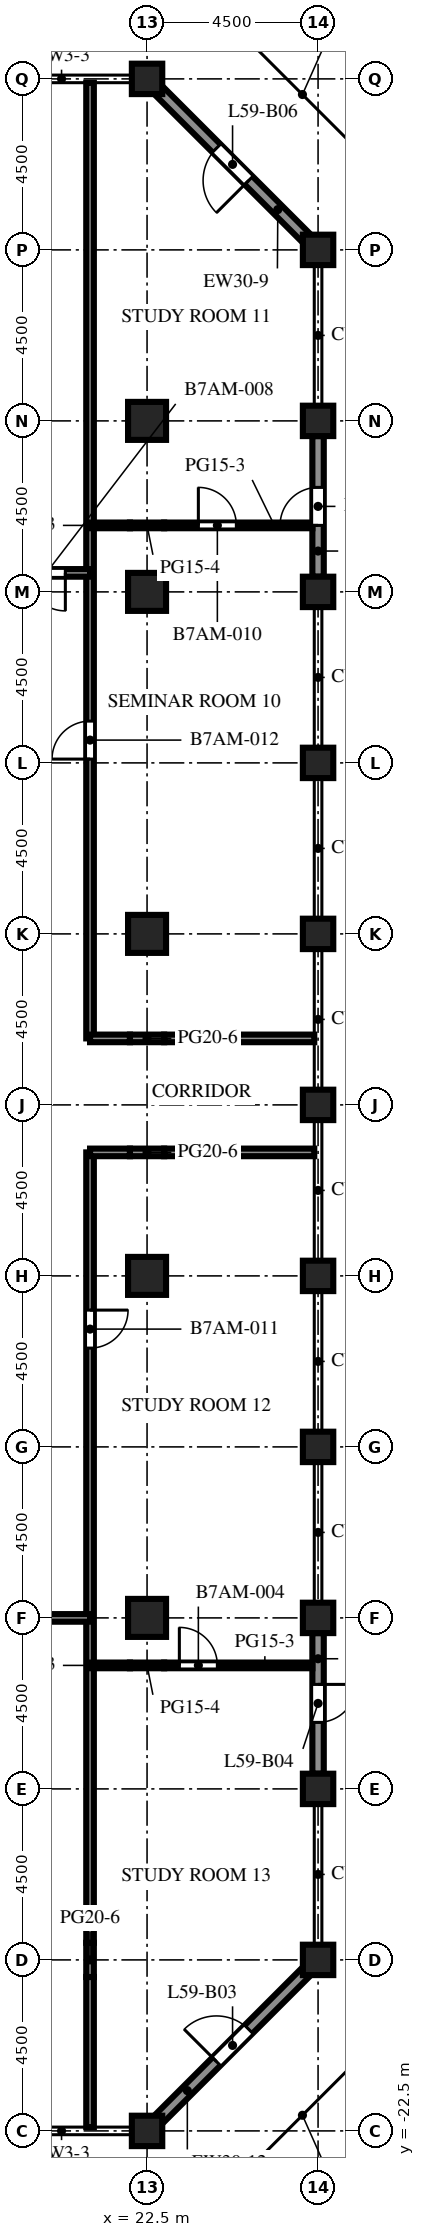
"""IFC4 building model, lengths in metres.
Left out: names, types, materials, properties, quantities, classifications, styles, units other than length and angle.
Written with IfcOpenShell. Run it as: python <this file> out.ifc"""

import sys

from ifc_helpers import new_model, si_unit, direction, frame, frame_2d, origin, origin_2d, place, context, subcontext, project, spatial, rectangle, extrude, element, fill, save


model = new_model("IFC4")
c1 = context("Model", 3, precision=1e-05, world=origin(), true_north=direction((0.0, 1.0)))
c2 = subcontext(c1, "Body", "Model", "MODEL_VIEW")
j1 = project(units=[si_unit("LENGTHUNIT", "METRE"), si_unit("PLANEANGLEUNIT", "RADIAN")], contexts=[c1])
p1 = place(None, origin())
s1 = spatial("IfcSite", under=j1, at=p1, CompositionType="ELEMENT")
p2 = place(p1, origin())
s2 = spatial("IfcBuilding", under=s1, at=p2, CompositionType="ELEMENT")
p3 = place(p2, frame((0.0, 0.0, 260.3)))
s3 = spatial("IfcBuildingStorey", under=s2, at=p3, CompositionType="ELEMENT", Elevation=260.3)
for number, where, z_axis, x_axis in (
    (1, (22.5, -22.5, 0.0), (0.0, 0.0, 1.0), (1.0, 0.0, 0.0)),
    (2, (22.5, 31.5, 0.0), (0.0, 0.0, 1.0), (1.0, 0.0, 0.0)),
):
    element("IfcColumn", number, at=place(p3, frame(where, z_axis=z_axis, x_axis=x_axis)), inside=s3, PredefinedType="COLUMN", context=c2, shape_type="SweptSolid", body=[
        extrude(rectangle(XDim=0.8, YDim=0.8, at=origin_2d()), origin(), (0.0, 0.0, 1.0), 6.0),
    ])
p4 = place(p3, frame((27.0, -18.0, 0.0), z_axis=(0.0, 0.0, 1.0), x_axis=(1.0, 0.0, 0.0)))
e3 = element("IfcColumn", 3, at=p4, inside=s3, PredefinedType="COLUMN", context=c2, shape_type="SweptSolid", body=[
    extrude(rectangle(XDim=0.8, YDim=0.8, at=origin_2d()), origin(), (0.0, 0.0, 1.0), 3.75),
])
for number, where, z_axis, x_axis in (
    (4, (27.0, -13.5, 0.0), (0.0, 0.0, 1.0), (1.0, 0.0, 0.0)),
    (5, (27.0, -9.0, 0.0), (0.0, 0.0, 1.0), (1.0, 0.0, 0.0)),
    (6, (27.0, -4.5, 0.0), (0.0, 0.0, 1.0), (1.0, 0.0, 0.0)),
    (7, (27.0, 0.0, 0.0), (0.0, 0.0, 1.0), (1.0, 0.0, 0.0)),
    (8, (27.0, 4.5, 0.0), (0.0, 0.0, 1.0), (1.0, 0.0, 0.0)),
    (9, (27.0, 9.0, 0.0), (0.0, 0.0, 1.0), (1.0, 0.0, 0.0)),
    (10, (27.0, 13.5, 0.0), (0.0, 0.0, 1.0), (1.0, 0.0, 0.0)),
    (11, (27.0, 18.0, 0.0), (0.0, 0.0, 1.0), (1.0, 0.0, 0.0)),
    (12, (27.0, 22.5, 0.0), (0.0, 0.0, 1.0), (1.0, 0.0, 0.0)),
    (13, (27.0, 27.0, 0.0), (0.0, 0.0, 1.0), (1.0, 0.0, 0.0)),
):
    element("IfcColumn", number, at=place(p3, frame(where, z_axis=z_axis, x_axis=x_axis)), inside=s3, PredefinedType="COLUMN", context=c2, shape_type="SweptSolid", body=[
        extrude(rectangle(XDim=0.8, YDim=0.8, at=origin_2d()), origin(), (0.0, 0.0, 1.0), 6.0),
    ])
for number, where, z_axis, x_axis in (
    (14, (22.5, -9.0, 0.0), (0.0, 0.0, 1.0), (1.0, 0.0, 0.0)),
    (15, (22.5, 0.0, 0.0), (0.0, 0.0, 1.0), (1.0, 0.0, 0.0)),
    (16, (22.5, 9.0, 0.0), (0.0, 0.0, 1.0), (1.0, 0.0, 0.0)),
    (17, (22.5, 18.0, 0.0), (0.0, 0.0, 1.0), (1.0, 0.0, 0.0)),
    (18, (22.5, 22.5, 0.0), (0.0, 0.0, 1.0), (1.0, 0.0, 0.0)),
):
    element("IfcColumn", number, at=place(p3, frame(where, z_axis=z_axis, x_axis=x_axis)), inside=s3, PredefinedType="COLUMN", context=c2, shape_type="SweptSolid", body=[
        extrude(rectangle(XDim=1.0, YDim=1.0, at=origin_2d()), origin(), (0.0, 0.0, 1.0), 5.55),
    ])
p5 = place(p3, frame((26.706, -18.294, 0.0), z_axis=(0.0, 0.0, 1.0), x_axis=(-0.707106781187, -0.707106781187, 0.0)))
e19 = element("IfcWall", 19, at=p5, inside=s3, PredefinedType="SOLIDWALL", context=c2, shape_type="SweptSolid", body=[
    extrude(rectangle(XDim=5.532, YDim=0.3, at=frame_2d((2.766, 0.0))), origin(), (0.0, 0.0, 1.0), 3.75),
])
p6 = place(p5, frame((2.166, 0.0, 0.0)))
e20 = element("IfcOpeningElement", 20, at=p6, cuts=e19, PredefinedType="OPENING", context=c2, shape_type="SweptSolid", body=[
    extrude(rectangle(XDim=1.2, YDim=2.2, at=frame_2d((0.6, 1.1))), frame((0.0, 0.16, 0.0), z_axis=(0.0, -1.0, 0.0), x_axis=(1.0, 0.0, 0.0)), (0.0, 0.0, 1.0), 0.32),
])
p7 = place(p3, frame((27.0, -9.4, 0.0), z_axis=(0.0, 0.0, 1.0), x_axis=(0.0, -1.0, 0.0)))
e21 = element("IfcWall", 21, at=p7, inside=s3, PredefinedType="SOLIDWALL", context=c2, shape_type="SweptSolid", body=[
    extrude(rectangle(XDim=3.7, YDim=0.3, at=frame_2d((1.85, 0.0))), origin(), (0.0, 0.0, 1.0), 4.75),
])
p8 = place(p7, frame((1.35, 0.0, 0.0)))
e22 = element("IfcOpeningElement", 22, at=p8, cuts=e21, PredefinedType="OPENING", context=c2, shape_type="SweptSolid", body=[
    extrude(rectangle(XDim=1.0, YDim=2.2, at=frame_2d((0.5, 1.1))), frame((0.0, 0.16, 0.0), z_axis=(0.0, -1.0, 0.0), x_axis=(1.0, 0.0, 0.0)), (0.0, 0.0, 1.0), 0.32),
])
p9 = place(p3, frame((27.0, 22.1, 0.0), z_axis=(0.0, 0.0, 1.0), x_axis=(0.0, -1.0, 0.0)))
e23 = element("IfcWall", 23, at=p9, inside=s3, PredefinedType="SOLIDWALL", context=c2, shape_type="SweptSolid", body=[
    extrude(rectangle(XDim=3.7, YDim=0.3, at=frame_2d((1.85, 0.0))), origin(), (0.0, 0.0, 1.0), 4.75),
])
p10 = place(p9, frame((1.35, 0.0, 0.0)))
e24 = element("IfcOpeningElement", 24, at=p10, cuts=e23, PredefinedType="OPENING", context=c2, shape_type="SweptSolid", body=[
    extrude(rectangle(XDim=1.0, YDim=2.2, at=frame_2d((0.5, 1.1))), frame((0.0, 0.16, 0.0), z_axis=(0.0, -1.0, 0.0), x_axis=(1.0, 0.0, 0.0)), (0.0, 0.0, 1.0), 0.32),
])
p11 = place(p3, frame((22.794, 31.206, 0.0), z_axis=(0.0, 0.0, 1.0), x_axis=(0.707106781187, -0.707106781187, 0.0)))
e25 = element("IfcWall", 25, at=p11, inside=s3, PredefinedType="SOLIDWALL", context=c2, shape_type="SweptSolid", body=[
    extrude(rectangle(XDim=5.532, YDim=0.3, at=frame_2d((2.766, 0.0))), origin(), (0.0, 0.0, 1.0), 4.75),
])
p12 = place(p11, frame((2.166, 0.0, 0.0)))
e26 = element("IfcOpeningElement", 26, at=p12, cuts=e25, PredefinedType="OPENING", context=c2, shape_type="SweptSolid", body=[
    extrude(rectangle(XDim=1.2, YDim=2.2, at=frame_2d((0.6, 1.1))), frame((0.0, 0.16, 0.0), z_axis=(0.0, -1.0, 0.0), x_axis=(1.0, 0.0, 0.0)), (0.0, 0.0, 1.0), 0.32),
])
p13 = place(p3, frame((21.0, -22.4, 0.0), z_axis=(0.0, 0.0, 1.0), x_axis=(0.0, 1.0, 0.0)))
e27 = element("IfcWall", 27, at=p13, inside=s3, PredefinedType="PARTITIONING", context=c2, shape_type="SweptSolid", body=[
    extrude(rectangle(XDim=3.95, YDim=0.2, at=frame_2d((1.975, 0.0))), origin(), (0.0, 0.0, 1.0), 5.55),
])
p14 = place(p3, frame((21.0, -18.45, 0.0), z_axis=(0.0, 0.0, 1.0), x_axis=(0.0, 1.0, 0.0)))
e28 = element("IfcWall", 28, at=p14, inside=s3, PredefinedType="PARTITIONING", context=c2, shape_type="SweptSolid", body=[
    extrude(rectangle(XDim=0.9, YDim=0.2, at=frame_2d((0.45, 0.0))), origin(), (0.0, 0.0, 1.0), 3.72),
])
p15 = place(p3, frame((21.0, 3.25, 0.0), z_axis=(0.0, 0.0, 1.0), x_axis=(0.0, -1.0, 0.0)))
e29 = element("IfcWall", 29, at=p15, inside=s3, PredefinedType="PARTITIONING", context=c2, shape_type="SweptSolid", body=[
    extrude(rectangle(XDim=20.8, YDim=0.2, at=frame_2d((10.4, 0.0))), origin(), (0.0, 0.0, 1.0), 5.55),
])
p16 = place(p15, frame((4.15, 0.0, 0.0)))
e30 = element("IfcOpeningElement", 30, at=p16, cuts=e29, PredefinedType="OPENING", context=c2, shape_type="SweptSolid", body=[
    extrude(rectangle(XDim=1.0, YDim=2.1, at=frame_2d((0.5, 1.05))), frame((0.0, 0.11, 0.0), z_axis=(0.0, -1.0, 0.0), x_axis=(1.0, 0.0, 0.0)), (0.0, 0.0, 1.0), 0.22),
])
p17 = place(p3, frame((21.0, 31.4, 0.0), z_axis=(0.0, 0.0, 1.0), x_axis=(0.0, -1.0, 0.0)))
e31 = element("IfcWall", 31, at=p17, inside=s3, PredefinedType="PARTITIONING", context=c2, shape_type="SweptSolid", body=[
    extrude(rectangle(XDim=25.15, YDim=0.2, at=frame_2d((12.575, 0.0))), origin(), (0.0, 0.0, 1.0), 5.55),
])
p18 = place(p17, frame((16.8, 0.0, 0.0)))
e32 = element("IfcOpeningElement", 32, at=p18, cuts=e31, PredefinedType="OPENING", context=c2, shape_type="SweptSolid", body=[
    extrude(rectangle(XDim=1.0, YDim=2.1, at=frame_2d((0.5, 1.05))), frame((0.0, 0.11, 0.0), z_axis=(0.0, -1.0, 0.0), x_axis=(1.0, 0.0, 0.0)), (0.0, 0.0, 1.0), 0.22),
])
p19 = place(p3, frame((21.0, -10.25, 0.0), z_axis=(0.0, 0.0, 1.0), x_axis=(1.0, 0.0, 0.0)))
e33 = element("IfcWall", 33, at=p19, inside=s3, PredefinedType="PARTITIONING", context=c2, shape_type="SweptSolid", body=[
    extrude(rectangle(XDim=1.05, YDim=0.15, at=frame_2d((0.525, 0.0))), origin(), (0.0, 0.0, 1.0), 5.55),
])
p20 = place(p3, frame((22.05, -10.25, 0.0), z_axis=(0.0, 0.0, 1.0), x_axis=(1.0, 0.0, 0.0)))
e34 = element("IfcWall", 34, at=p20, inside=s3, PredefinedType="PARTITIONING", context=c2, shape_type="SweptSolid", body=[
    extrude(rectangle(XDim=0.9, YDim=0.15, at=frame_2d((0.45, 0.0))), origin(), (0.0, 0.0, 1.0), 3.72),
])
p21 = place(p3, frame((26.85, -10.25, 0.0), z_axis=(0.0, 0.0, 1.0), x_axis=(-1.0, 0.0, 0.0)))
e35 = element("IfcWall", 35, at=p21, inside=s3, PredefinedType="PARTITIONING", context=c2, shape_type="SweptSolid", body=[
    extrude(rectangle(XDim=3.9, YDim=0.15, at=frame_2d((1.95, 0.0))), origin(), (0.0, 0.0, 1.0), 5.55),
])
p22 = place(p21, frame((2.5, 0.0, 0.0)))
e36 = element("IfcOpeningElement", 36, at=p22, cuts=e35, PredefinedType="OPENING", context=c2, shape_type="SweptSolid", body=[
    extrude(rectangle(XDim=1.0, YDim=2.1, at=frame_2d((0.5, 1.05))), frame((0.0, 0.085, 0.0), z_axis=(0.0, -1.0, 0.0), x_axis=(1.0, 0.0, 0.0)), (0.0, 0.0, 1.0), 0.17),
])
p23 = place(p3, frame((18.0, -9.0, 0.0), z_axis=(0.0, 0.0, 1.0), x_axis=(1.0, 0.0, 0.0)))
e37 = element("IfcWall", 37, at=p23, inside=s3, PredefinedType="PARTITIONING", context=c2, shape_type="SweptSolid", body=[
    extrude(rectangle(XDim=3.0, YDim=0.2, at=frame_2d((1.5, 0.0))), origin(), (0.0, 0.0, 1.0), 5.55),
])
p24 = place(p3, frame((21.0, 3.25, 0.0), z_axis=(0.0, 0.0, 1.0), x_axis=(1.0, 0.0, 0.0)))
e38 = element("IfcWall", 38, at=p24, inside=s3, PredefinedType="PARTITIONING", context=c2, shape_type="SweptSolid", body=[
    extrude(rectangle(XDim=1.05, YDim=0.2, at=frame_2d((0.525, 0.0))), origin(), (0.0, 0.0, 1.0), 5.55),
])
p25 = place(p3, frame((22.05, 3.25, 0.0), z_axis=(0.0, 0.0, 1.0), x_axis=(1.0, 0.0, 0.0)))
e39 = element("IfcWall", 39, at=p25, inside=s3, PredefinedType="PARTITIONING", context=c2, shape_type="SweptSolid", body=[
    extrude(rectangle(XDim=0.9, YDim=0.2, at=frame_2d((0.45, 0.0))), origin(), (0.0, 0.0, 1.0), 3.72),
])
p26 = place(p3, frame((22.95, 3.25, 0.0), z_axis=(0.0, 0.0, 1.0), x_axis=(1.0, 0.0, 0.0)))
e40 = element("IfcWall", 40, at=p26, inside=s3, PredefinedType="PARTITIONING", context=c2, shape_type="SweptSolid", body=[
    extrude(rectangle(XDim=3.95, YDim=0.2, at=frame_2d((1.975, 0.0))), origin(), (0.0, 0.0, 1.0), 5.55),
])
p27 = place(p3, frame((21.0, 6.25, 0.0), z_axis=(0.0, 0.0, 1.0), x_axis=(1.0, 0.0, 0.0)))
e41 = element("IfcWall", 41, at=p27, inside=s3, PredefinedType="PARTITIONING", context=c2, shape_type="SweptSolid", body=[
    extrude(rectangle(XDim=1.05, YDim=0.2, at=frame_2d((0.525, 0.0))), origin(), (0.0, 0.0, 1.0), 5.55),
])
p28 = place(p3, frame((22.05, 6.25, 0.0), z_axis=(0.0, 0.0, 1.0), x_axis=(1.0, 0.0, 0.0)))
e42 = element("IfcWall", 42, at=p28, inside=s3, PredefinedType="PARTITIONING", context=c2, shape_type="SweptSolid", body=[
    extrude(rectangle(XDim=0.9, YDim=0.2, at=frame_2d((0.45, 0.0))), origin(), (0.0, 0.0, 1.0), 3.72),
])
p29 = place(p3, frame((22.95, 6.25, 0.0), z_axis=(0.0, 0.0, 1.0), x_axis=(1.0, 0.0, 0.0)))
e43 = element("IfcWall", 43, at=p29, inside=s3, PredefinedType="PARTITIONING", context=c2, shape_type="SweptSolid", body=[
    extrude(rectangle(XDim=3.95, YDim=0.2, at=frame_2d((1.975, 0.0))), origin(), (0.0, 0.0, 1.0), 5.55),
])
p30 = place(p3, frame((18.0, 18.5, 0.0), z_axis=(0.0, 0.0, 1.0), x_axis=(1.0, 0.0, 0.0)))
e44 = element("IfcWall", 44, at=p30, inside=s3, PredefinedType="PARTITIONING", context=c2, shape_type="SweptSolid", body=[
    extrude(rectangle(XDim=3.0, YDim=0.2, at=frame_2d((1.5, 0.0))), origin(), (0.0, 0.0, 1.0), 5.55),
])
p31 = place(p30, frame((1.35, 0.0, 0.0)))
e45 = element("IfcOpeningElement", 45, at=p31, cuts=e44, PredefinedType="OPENING", context=c2, shape_type="SweptSolid", body=[
    extrude(rectangle(XDim=1.0, YDim=2.1, at=frame_2d((0.5, 1.05))), frame((0.0, 0.11, 0.0), z_axis=(0.0, -1.0, 0.0), x_axis=(1.0, 0.0, 0.0)), (0.0, 0.0, 1.0), 0.22),
])
p32 = place(p3, frame((21.0, 19.75, 0.0), z_axis=(0.0, 0.0, 1.0), x_axis=(1.0, 0.0, 0.0)))
e46 = element("IfcWall", 46, at=p32, inside=s3, PredefinedType="PARTITIONING", context=c2, shape_type="SweptSolid", body=[
    extrude(rectangle(XDim=1.05, YDim=0.15, at=frame_2d((0.525, 0.0))), origin(), (0.0, 0.0, 1.0), 5.55),
])
p33 = place(p3, frame((22.05, 19.75, 0.0), z_axis=(0.0, 0.0, 1.0), x_axis=(1.0, 0.0, 0.0)))
e47 = element("IfcWall", 47, at=p33, inside=s3, PredefinedType="PARTITIONING", context=c2, shape_type="SweptSolid", body=[
    extrude(rectangle(XDim=0.9, YDim=0.15, at=frame_2d((0.45, 0.0))), origin(), (0.0, 0.0, 1.0), 3.72),
])
p34 = place(p3, frame((22.95, 19.75, 0.0), z_axis=(0.0, 0.0, 1.0), x_axis=(1.0, 0.0, 0.0)))
e48 = element("IfcWall", 48, at=p34, inside=s3, PredefinedType="PARTITIONING", context=c2, shape_type="SweptSolid", body=[
    extrude(rectangle(XDim=3.9, YDim=0.15, at=frame_2d((1.95, 0.0))), origin(), (0.0, 0.0, 1.0), 5.55),
])
p35 = place(p34, frame((0.9, 0.0, 0.0)))
e49 = element("IfcOpeningElement", 49, at=p35, cuts=e48, PredefinedType="OPENING", context=c2, shape_type="SweptSolid", body=[
    extrude(rectangle(XDim=1.0, YDim=2.1, at=frame_2d((0.5, 1.05))), frame((0.0, 0.085, 0.0), z_axis=(0.0, -1.0, 0.0), x_axis=(1.0, 0.0, 0.0)), (0.0, 0.0, 1.0), 0.17),
])
p36 = place(p6, origin())
e50 = element("IfcDoor", 50, at=p36, inside=s3, OperationType="SINGLE_SWING_RIGHT", PredefinedType="DOOR", context=c2, shape_type="SweptSolid", body=[
    extrude(rectangle(XDim=1.2, YDim=2.2, at=frame_2d((0.6, 1.1))), frame((0.0, 0.025, 0.0), z_axis=(0.0, -1.0, 0.0), x_axis=(1.0, 0.0, 0.0)), (0.0, 0.0, 1.0), 0.05),
])
fill(e20, e50)
p37 = place(p8, origin())
e51 = element("IfcDoor", 51, at=p37, inside=s3, OperationType="SINGLE_SWING_LEFT", PredefinedType="DOOR", context=c2, shape_type="SweptSolid", body=[
    extrude(rectangle(XDim=1.0, YDim=2.2, at=frame_2d((0.5, 1.1))), frame((0.0, 0.025, 0.0), z_axis=(0.0, -1.0, 0.0), x_axis=(1.0, 0.0, 0.0)), (0.0, 0.0, 1.0), 0.05),
])
fill(e22, e51)
p38 = place(p10, origin())
e52 = element("IfcDoor", 52, at=p38, inside=s3, OperationType="SINGLE_SWING_RIGHT", PredefinedType="DOOR", context=c2, shape_type="SweptSolid", body=[
    extrude(rectangle(XDim=1.0, YDim=2.2, at=frame_2d((0.5, 1.1))), frame((0.0, 0.025, 0.0), z_axis=(0.0, -1.0, 0.0), x_axis=(1.0, 0.0, 0.0)), (0.0, 0.0, 1.0), 0.05),
])
fill(e24, e52)
p39 = place(p12, origin())
e53 = element("IfcDoor", 53, at=p39, inside=s3, OperationType="SINGLE_SWING_RIGHT", PredefinedType="DOOR", context=c2, shape_type="SweptSolid", body=[
    extrude(rectangle(XDim=1.2, YDim=2.2, at=frame_2d((0.6, 1.1))), frame((0.0, 0.025, 0.0), z_axis=(0.0, -1.0, 0.0), x_axis=(1.0, 0.0, 0.0)), (0.0, 0.0, 1.0), 0.05),
])
fill(e26, e53)
p40 = place(p22, origin())
e54 = element("IfcDoor", 54, at=p40, inside=s3, OperationType="SINGLE_SWING_RIGHT", PredefinedType="DOOR", context=c2, shape_type="SweptSolid", body=[
    extrude(rectangle(XDim=1.0, YDim=2.1, at=frame_2d((0.5, 1.05))), frame((0.0, 0.025, 0.0), z_axis=(0.0, -1.0, 0.0), x_axis=(1.0, 0.0, 0.0)), (0.0, 0.0, 1.0), 0.05),
])
fill(e36, e54)
p41 = place(p31, origin())
e55 = element("IfcDoor", 55, at=p41, inside=s3, OperationType="SINGLE_SWING_RIGHT", PredefinedType="DOOR", context=c2, shape_type="SweptSolid", body=[
    extrude(rectangle(XDim=1.0, YDim=2.1, at=frame_2d((0.5, 1.05))), frame((0.0, 0.025, 0.0), z_axis=(0.0, -1.0, 0.0), x_axis=(1.0, 0.0, 0.0)), (0.0, 0.0, 1.0), 0.05),
])
fill(e45, e55)
p42 = place(p35, origin())
e56 = element("IfcDoor", 56, at=p42, inside=s3, OperationType="SINGLE_SWING_LEFT", PredefinedType="DOOR", context=c2, shape_type="SweptSolid", body=[
    extrude(rectangle(XDim=1.0, YDim=2.1, at=frame_2d((0.5, 1.05))), frame((0.0, 0.025, 0.0), z_axis=(0.0, -1.0, 0.0), x_axis=(1.0, 0.0, 0.0)), (0.0, 0.0, 1.0), 0.05),
])
fill(e49, e56)
p43 = place(p16, origin())
e57 = element("IfcDoor", 57, at=p43, inside=s3, OperationType="SINGLE_SWING_LEFT", PredefinedType="DOOR", context=c2, shape_type="SweptSolid", body=[
    extrude(rectangle(XDim=1.0, YDim=2.1, at=frame_2d((0.5, 1.05))), frame((0.0, 0.025, 0.0), z_axis=(0.0, -1.0, 0.0), x_axis=(1.0, 0.0, 0.0)), (0.0, 0.0, 1.0), 0.05),
])
fill(e30, e57)
p44 = place(p18, origin())
e58 = element("IfcDoor", 58, at=p44, inside=s3, OperationType="SINGLE_SWING_RIGHT", PredefinedType="DOOR", context=c2, shape_type="SweptSolid", body=[
    extrude(rectangle(XDim=1.0, YDim=2.1, at=frame_2d((0.5, 1.05))), frame((0.0, 0.025, 0.0), z_axis=(0.0, -1.0, 0.0), x_axis=(1.0, 0.0, 0.0)), (0.0, 0.0, 1.0), 0.05),
])
fill(e32, e58)
save(model, sys.argv[1])
